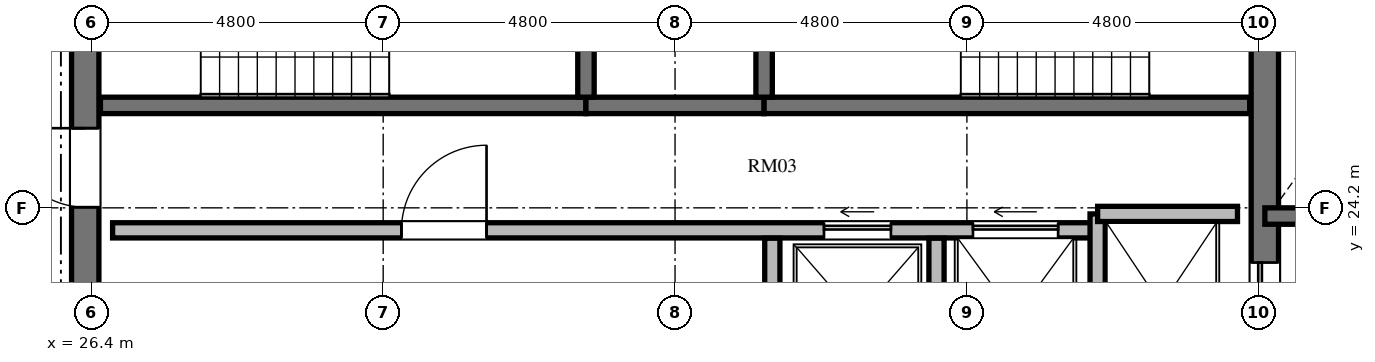
"""IFC4 building model, lengths in metres.
Left out: names, types, materials, properties, quantities, classifications, styles, units other than length and angle.
Written with IfcOpenShell. Run it as: python <this file> out.ifc"""

import sys

from ifc_helpers import new_model, si_unit, direction, frame, frame_2d, origin, place, context, subcontext, project, spatial, rectangle, extrude, element, fill, save


model = new_model("IFC4")
c1 = context("Model", 3, precision=1e-05, world=origin(), true_north=direction((0.0, 1.0)))
c2 = subcontext(c1, "Body", "Model", "MODEL_VIEW")
j1 = project(units=[si_unit("LENGTHUNIT", "METRE"), si_unit("PLANEANGLEUNIT", "RADIAN")], contexts=[c1])
p1 = place(None, origin())
s1 = spatial("IfcSite", under=j1, at=p1, CompositionType="ELEMENT")
p2 = place(p1, origin())
s2 = spatial("IfcBuilding", under=s1, at=p2, CompositionType="ELEMENT")
p3 = place(p2, frame((0.0, 0.0, 291.504)))
s3 = spatial("IfcBuildingStorey", under=s2, at=p3, CompositionType="ELEMENT", Elevation=291.504)
p4 = place(p3, frame((26.3, 20.95, 0.0), z_axis=(0.0, 0.0, 1.0), x_axis=(0.0, 1.0, 0.0)))
e1 = element("IfcWall", 1, at=p4, inside=s3, PredefinedType="SHEAR", context=c2, shape_type="SweptSolid", body=[
    extrude(rectangle(XDim=14.1, YDim=0.45, at=frame_2d((7.05, 0.0))), origin(), (0.0, 0.0, 1.0), 3.648),
])
p5 = place(p4, frame((6.5, 0.0, 0.0)))
e2 = element("IfcOpeningElement", 2, at=p5, cuts=e1, PredefinedType="OPENING", context=c2, shape_type="SweptSolid", body=[
    extrude(rectangle(XDim=1.2, YDim=2.15, at=frame_2d((0.6, 1.075))), frame((0.0, 0.235, 0.0), z_axis=(0.0, -1.0, 0.0), x_axis=(1.0, 0.0, 0.0)), (0.0, 0.0, 1.0), 0.47),
])
p6 = place(p4, frame((9.6, 0.0, 0.0)))
e3 = element("IfcOpeningElement", 3, at=p6, cuts=e1, PredefinedType="OPENING", context=c2, shape_type="SweptSolid", body=[
    extrude(rectangle(XDim=1.3, YDim=2.2, at=frame_2d((0.65, 1.1))), frame((0.0, 0.235, 0.0), z_axis=(0.0, -1.0, 0.0), x_axis=(1.0, 0.0, 0.0)), (0.0, 0.0, 1.0), 0.47),
])
p7 = place(p4, frame((3.26, 0.0, 0.0)))
e4 = element("IfcOpeningElement", 4, at=p7, cuts=e1, PredefinedType="OPENING", context=c2, shape_type="SweptSolid", body=[
    extrude(rectangle(XDim=1.3, YDim=2.2, at=frame_2d((0.65, 1.1))), frame((0.0, 0.235, 0.0), z_axis=(0.0, -1.0, 0.0), x_axis=(1.0, 0.0, 0.0)), (0.0, 0.0, 1.0), 0.47),
])
p8 = place(p3, frame((45.7, 20.95, 0.0), z_axis=(0.0, 0.0, 1.0), x_axis=(0.0, 1.0, 0.0)))
e5 = element("IfcWall", 5, at=p8, inside=s3, PredefinedType="SHEAR", context=c2, shape_type="SweptSolid", body=[
    extrude(rectangle(XDim=14.1, YDim=0.45, at=frame_2d((7.05, 0.0))), origin(), (0.0, 0.0, 1.0), 3.648),
])
p9 = place(p8, frame((11.75, 0.0, 0.0)))
e6 = element("IfcOpeningElement", 6, at=p9, cuts=e5, PredefinedType="OPENING", context=c2, shape_type="SweptSolid", body=[
    extrude(rectangle(XDim=1.4, YDim=2.3, at=frame_2d((0.7, 1.15))), frame((0.0, 0.235, 0.0), z_axis=(0.0, -1.0, 0.0), x_axis=(1.0, 0.0, 0.0)), (0.0, 0.0, 1.0), 0.47),
])
p10 = place(p8, frame((0.95, 0.0, 0.0)))
e7 = element("IfcOpeningElement", 7, at=p10, cuts=e5, PredefinedType="OPENING", context=c2, shape_type="SweptSolid", body=[
    extrude(rectangle(XDim=1.4, YDim=2.3, at=frame_2d((0.7, 1.15))), frame((0.0, 0.235, 0.0), z_axis=(0.0, -1.0, 0.0), x_axis=(1.0, 0.0, 0.0)), (0.0, 0.0, 1.0), 0.47),
])
p11 = place(p3, frame((26.55, 25.885, 0.0), z_axis=(0.0, 0.0, 1.0), x_axis=(1.0, 0.0, 0.0)))
e8 = element("IfcWall", 8, at=p11, inside=s3, PredefinedType="SHEAR", context=c2, shape_type="SweptSolid", body=[
    extrude(rectangle(XDim=7.985, YDim=0.27, at=frame_2d((3.992, 0.0))), origin(), (0.0, 0.0, 1.0), 3.648),
])
p12 = place(p3, frame((34.535, 25.885, 0.0), z_axis=(0.0, 0.0, 1.0), x_axis=(1.0, 0.0, 0.0)))
e9 = element("IfcWall", 9, at=p12, inside=s3, PredefinedType="SHEAR", context=c2, shape_type="SweptSolid", body=[
    extrude(rectangle(XDim=2.93, YDim=0.27, at=frame_2d((1.465, 0.0))), origin(), (0.0, 0.0, 1.0), 3.648),
])
p13 = place(p3, frame((37.465, 25.885, 0.0), z_axis=(0.0, 0.0, 1.0), x_axis=(1.0, 0.0, 0.0)))
e10 = element("IfcWall", 10, at=p13, inside=s3, PredefinedType="SHEAR", context=c2, shape_type="SweptSolid", body=[
    extrude(rectangle(XDim=7.985, YDim=0.27, at=frame_2d((3.992, 0.0))), origin(), (0.0, 0.0, 1.0), 3.648),
])
for number, where, z_axis, x_axis in (
    (11, (34.535, 26.02, 0.0), (0.0, 0.0, 1.0), (0.0, 1.0, 0.0)),
    (12, (37.465, 26.02, 0.0), (0.0, 0.0, 1.0), (0.0, 1.0, 0.0)),
):
    element("IfcWall", number, at=place(p3, frame(where, z_axis=z_axis, x_axis=x_axis)), inside=s3, PredefinedType="SHEAR", context=c2, shape_type="SweptSolid", body=[
        extrude(rectangle(XDim=4.08, YDim=0.27, at=frame_2d((2.04, 0.0))), origin(), (0.0, 0.0, 1.0), 3.648),
    ])
p14 = place(p3, frame((26.75, 23.83, 0.0), z_axis=(0.0, 0.0, 1.0), x_axis=(1.0, 0.0, 0.0)))
e13 = element("IfcWall", 13, at=p14, inside=s3, PredefinedType="SOLIDWALL", context=c2, shape_type="SweptSolid", body=[
    extrude(rectangle(XDim=16.2, YDim=0.25, at=frame_2d((8.1, 0.0))), origin(), (0.0, 0.0, 1.0), 3.448),
])
p15 = place(p14, frame((4.75, 0.0, 0.0)))
e14 = element("IfcOpeningElement", 14, at=p15, cuts=e13, PredefinedType="OPENING", context=c2, shape_type="SweptSolid", body=[
    extrude(rectangle(XDim=1.4, YDim=2.2, at=frame_2d((0.7, 1.1))), frame((0.0, 0.135, 0.0), z_axis=(0.0, -1.0, 0.0), x_axis=(1.0, 0.0, 0.0)), (0.0, 0.0, 1.0), 0.27),
])
p16 = place(p14, frame((11.7, 0.0, 0.0)))
e15 = element("IfcOpeningElement", 15, at=p16, cuts=e13, PredefinedType="OPENING", context=c2, shape_type="SweptSolid", body=[
    extrude(rectangle(XDim=1.1, YDim=2.2, at=frame_2d((0.55, 1.1))), frame((0.0, 0.135, 0.0), z_axis=(0.0, -1.0, 0.0), x_axis=(1.0, 0.0, 0.0)), (0.0, 0.0, 1.0), 0.27),
])
p17 = place(p14, frame((14.15, 0.0, 0.0)))
e16 = element("IfcOpeningElement", 16, at=p17, cuts=e13, PredefinedType="OPENING", context=c2, shape_type="SweptSolid", body=[
    extrude(rectangle(XDim=1.4, YDim=2.3, at=frame_2d((0.7, 1.15))), frame((0.0, 0.135, 0.0), z_axis=(0.0, -1.0, 0.0), x_axis=(1.0, 0.0, 0.0)), (0.0, 0.0, 1.0), 0.27),
])
p18 = place(p3, frame((42.95, 20.9, 0.0), z_axis=(0.0, 0.0, 1.0), x_axis=(0.0, 1.0, 0.0)))
e17 = element("IfcWall", 17, at=p18, inside=s3, PredefinedType="SOLIDWALL", context=c2, shape_type="SweptSolid", body=[
    extrude(rectangle(XDim=3.2, YDim=0.25, at=frame_2d((1.6, 0.0))), origin(), (0.0, 0.0, 1.0), 3.448),
])
p19 = place(p3, frame((42.95, 24.1, 0.0), z_axis=(0.0, 0.0, 1.0), x_axis=(1.0, 0.0, 0.0)))
e18 = element("IfcWall", 18, at=p19, inside=s3, PredefinedType="SOLIDWALL", context=c2, shape_type="SweptSolid", body=[
    extrude(rectangle(XDim=2.3, YDim=0.25, at=frame_2d((1.15, 0.0))), origin(), (0.0, 0.0, 1.0), 3.448),
])
for number, where, z_axis, x_axis in (
    (19, (37.6, 20.9, 0.0), (0.0, 0.0, 1.0), (0.0, 1.0, 0.0)),
    (20, (40.3, 20.9, 0.0), (0.0, 0.0, 1.0), (0.0, 1.0, 0.0)),
):
    element("IfcWall", number, at=place(p3, frame(where, z_axis=z_axis, x_axis=x_axis)), inside=s3, PredefinedType="SOLIDWALL", context=c2, shape_type="SweptSolid", body=[
        extrude(rectangle(XDim=2.8, YDim=0.25, at=frame_2d((1.4, 0.0))), origin(), (0.0, 0.0, 1.0), 3.448),
    ])
p20 = place(p3, frame((45.7, 24.065, 0.0), z_axis=(0.0, 0.0, 1.0), x_axis=(1.0, 0.0, 0.0)))
e21 = element("IfcWall", 21, at=p20, inside=s3, PredefinedType="SHEAR", context=c2, shape_type="SweptSolid", body=[
    extrude(rectangle(XDim=4.715, YDim=0.27, at=frame_2d((2.357, 0.0))), origin(), (0.0, 0.0, 1.0), 3.648),
])
p21 = place(p7, origin())
e22 = element("IfcDoor", 22, at=p21, inside=s3, OperationType="SINGLE_SWING_RIGHT", PredefinedType="DOOR", context=c2, shape_type="SweptSolid", body=[
    extrude(rectangle(XDim=1.3, YDim=2.2, at=frame_2d((0.65, 1.1))), frame((0.0, 0.025, 0.0), z_axis=(0.0, -1.0, 0.0), x_axis=(1.0, 0.0, 0.0)), (0.0, 0.0, 1.0), 0.05),
])
fill(e4, e22)
p22 = place(p15, origin())
e23 = element("IfcDoor", 23, at=p22, inside=s3, OperationType="SINGLE_SWING_RIGHT", PredefinedType="DOOR", context=c2, shape_type="SweptSolid", body=[
    extrude(rectangle(XDim=1.4, YDim=2.2, at=frame_2d((0.7, 1.1))), frame((0.0, 0.025, 0.0), z_axis=(0.0, -1.0, 0.0), x_axis=(1.0, 0.0, 0.0)), (0.0, 0.0, 1.0), 0.05),
])
fill(e14, e23)
p23 = place(p16, origin())
e24 = element("IfcDoor", 24, at=p23, inside=s3, OperationType="SLIDING_TO_LEFT", PredefinedType="DOOR", context=c2, shape_type="SweptSolid", body=[
    extrude(rectangle(XDim=1.1, YDim=2.2, at=frame_2d((0.55, 1.1))), frame((0.0, 0.025, 0.0), z_axis=(0.0, -1.0, 0.0), x_axis=(1.0, 0.0, 0.0)), (0.0, 0.0, 1.0), 0.05),
])
fill(e15, e24)
p24 = place(p10, origin())
e25 = element("IfcDoor", 25, at=p24, inside=s3, OperationType="SLIDING_TO_LEFT", PredefinedType="DOOR", context=c2, shape_type="SweptSolid", body=[
    extrude(rectangle(XDim=1.4, YDim=2.3, at=frame_2d((0.7, 1.15))), frame((0.0, 0.025, 0.0), z_axis=(0.0, -1.0, 0.0), x_axis=(1.0, 0.0, 0.0)), (0.0, 0.0, 1.0), 0.05),
])
fill(e7, e25)
p25 = place(p17, origin())
e26 = element("IfcDoor", 26, at=p25, inside=s3, OperationType="SLIDING_TO_LEFT", PredefinedType="DOOR", context=c2, shape_type="SweptSolid", body=[
    extrude(rectangle(XDim=1.4, YDim=2.3, at=frame_2d((0.7, 1.15))), frame((0.0, 0.025, 0.0), z_axis=(0.0, -1.0, 0.0), x_axis=(1.0, 0.0, 0.0)), (0.0, 0.0, 1.0), 0.05),
])
fill(e16, e26)
save(model, sys.argv[1])
